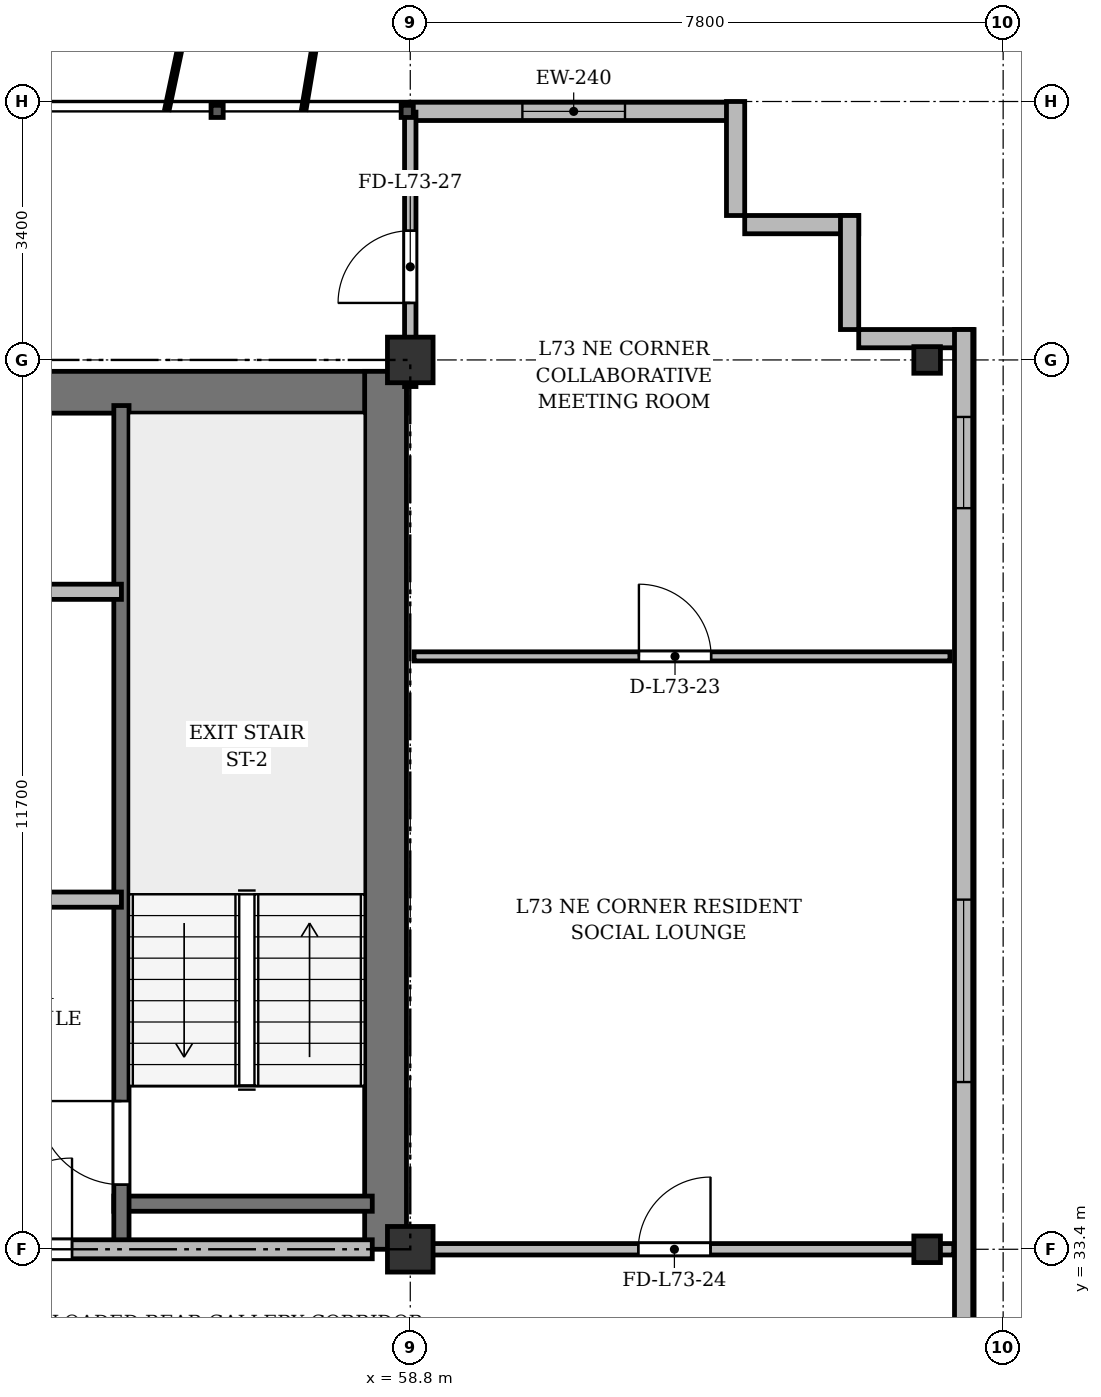
"""IFC4 building model, lengths in metres.
Left out: names, types, materials, properties, quantities, classifications, styles, units other than length and angle.
Written with IfcOpenShell. Run it as: python <this file> out.ifc"""

import sys

from ifc_helpers import new_model, si_unit, direction, frame, frame_2d, origin, origin_2d, place, context, subcontext, project, spatial, rectangle, i_section, extrude, source, transform, mapped, element, fill, save


model = new_model("IFC4")
c1 = context("Model", 3, precision=1e-05, world=origin(), true_north=direction((0.0, 1.0)))
c2 = subcontext(c1, "Body", "Model", "MODEL_VIEW")
j1 = project(units=[si_unit("LENGTHUNIT", "METRE"), si_unit("PLANEANGLEUNIT", "RADIAN")], contexts=[c1])
p1 = place(None, origin())
s1 = spatial("IfcSite", under=j1, at=p1, CompositionType="ELEMENT")
p2 = place(p1, origin())
s2 = spatial("IfcBuilding", under=s1, at=p2, CompositionType="ELEMENT")
p3 = place(p2, frame((0.0, 0.0, 281.1)))
s3 = spatial("IfcBuildingStorey", under=s2, at=p3, CompositionType="ELEMENT", Elevation=281.1)
m1 = source(origin(), c2, "Body", "SweptSolid", [
    extrude(rectangle(XDim=0.6, YDim=0.6, at=origin_2d()), origin(), (0.0, 0.0, 1.0), 3.6),
])
for number, where, z_axis, x_axis in (
    (1, (58.8, 33.4, 0.0), (0.0, 0.0, 1.0), (1.0, 0.0, 0.0)),
    (2, (58.8, 45.1, 0.0), (0.0, 0.0, 1.0), (1.0, 0.0, 0.0)),
):
    element("IfcColumn", number, at=place(p3, frame(where, z_axis=z_axis, x_axis=x_axis)), inside=s3, PredefinedType="COLUMN", context=c2, shape_type="MappedRepresentation", body=[
        mapped(m1, transform((0.0, 0.0, 0.0), x_axis=(1.0, 0.0, 0.0), y_axis=(0.0, 1.0, 0.0), z_axis=(0.0, 0.0, 1.0), scale=1.0)),
    ])
m2 = source(origin(), c2, "Body", "SweptSolid", [
    extrude(i_section(OverallWidth=0.35, OverallDepth=0.35, WebThickness=0.018, FlangeThickness=0.028, at=origin_2d()), origin(), (0.0, 0.0, 1.0), 3.6),
])
for number, where, z_axis, x_axis in (
    (3, (65.6, 33.4, 0.0), (0.0, 0.0, 1.0), (1.0, 0.0, 0.0)),
    (4, (65.6, 45.1, 0.0), (0.0, 0.0, 1.0), (1.0, 0.0, 0.0)),
):
    element("IfcColumn", number, at=place(p3, frame(where, z_axis=z_axis, x_axis=x_axis)), inside=s3, PredefinedType="COLUMN", context=c2, shape_type="MappedRepresentation", body=[
        mapped(m2, transform((0.0, 0.0, 0.0), x_axis=(1.0, 0.0, 0.0), y_axis=(0.0, 1.0, 0.0), z_axis=(0.0, 0.0, 1.0), scale=1.0)),
    ])
p4 = place(p3, frame((58.8, 48.37, 0.0), z_axis=(0.0, 0.0, 1.0), x_axis=(1.0, 0.0, 0.0)))
e5 = element("IfcWall", 5, at=p4, inside=s3, PredefinedType="SOLIDWALL", context=c2, shape_type="SweptSolid", body=[
    extrude(rectangle(XDim=4.3, YDim=0.24, at=frame_2d((2.15, 0.0))), origin(), (0.0, 0.0, 1.0), 3.37),
])
p5 = place(p4, frame((1.475, 0.0, 0.9)))
e6 = element("IfcOpeningElement", 6, at=p5, cuts=e5, PredefinedType="OPENING", context=c2, shape_type="SweptSolid", body=[
    extrude(rectangle(XDim=1.35, YDim=1.5, at=frame_2d((0.675, 0.75))), frame((0.0, 0.13, 0.0), z_axis=(0.0, -1.0, 0.0), x_axis=(1.0, 0.0, 0.0)), (0.0, 0.0, 1.0), 0.26),
])
for number, where, z_axis, x_axis in (
    (7, (63.08, 48.5, 0.0), (0.0, 0.0, 1.0), (0.0, -1.0, 0.0)),
    (8, (63.2, 46.88, 0.0), (0.0, 0.0, 1.0), (1.0, 0.0, 0.0)),
    (9, (64.58, 47.0, 0.0), (0.0, 0.0, 1.0), (0.0, -1.0, 0.0)),
    (10, (64.7, 45.38, 0.0), (0.0, 0.0, 1.0), (1.0, 0.0, 0.0)),
):
    element("IfcWall", number, at=place(p3, frame(where, z_axis=z_axis, x_axis=x_axis)), inside=s3, PredefinedType="SOLIDWALL", context=c2, shape_type="SweptSolid", body=[
        extrude(rectangle(XDim=1.5, YDim=0.24, at=frame_2d((0.75, 0.0))), origin(), (0.0, 0.0, 1.0), 3.37),
    ])
p6 = place(p3, frame((66.08, 45.5, 0.0), z_axis=(0.0, 0.0, 1.0), x_axis=(0.0, -1.0, 0.0)))
e11 = element("IfcWall", 11, at=p6, inside=s3, PredefinedType="SOLIDWALL", context=c2, shape_type="SweptSolid", body=[
    extrude(rectangle(XDim=39.0, YDim=0.24, at=frame_2d((19.5, 0.0))), origin(), (0.0, 0.0, 1.0), 3.37),
])
p7 = place(p6, frame((36.35, 0.0, 0.92)))
e12 = element("IfcOpeningElement", 12, at=p7, cuts=e11, PredefinedType="OPENING", context=c2, shape_type="SweptSolid", body=[
    extrude(rectangle(XDim=1.2, YDim=1.65, at=frame_2d((0.6, 0.825))), frame((0.0, 0.13, 0.0), z_axis=(0.0, -1.0, 0.0), x_axis=(1.0, 0.0, 0.0)), (0.0, 0.0, 1.0), 0.26),
])
p8 = place(p6, frame((32.9, 0.0, 0.92)))
e13 = element("IfcOpeningElement", 13, at=p8, cuts=e11, PredefinedType="OPENING", context=c2, shape_type="SweptSolid", body=[
    extrude(rectangle(XDim=2.4, YDim=2.1, at=frame_2d((1.2, 1.05))), frame((0.0, 0.13, 0.0), z_axis=(0.0, -1.0, 0.0), x_axis=(1.0, 0.0, 0.0)), (0.0, 0.0, 1.0), 0.26),
])
p9 = place(p6, frame((21.5, 0.0, 0.92)))
e14 = element("IfcOpeningElement", 14, at=p9, cuts=e11, PredefinedType="OPENING", context=c2, shape_type="SweptSolid", body=[
    extrude(rectangle(XDim=2.4, YDim=2.1, at=frame_2d((1.2, 1.05))), frame((0.0, 0.13, 0.0), z_axis=(0.0, -1.0, 0.0), x_axis=(1.0, 0.0, 0.0)), (0.0, 0.0, 1.0), 0.26),
])
p10 = place(p6, frame((7.5, 0.0, 0.92)))
e15 = element("IfcOpeningElement", 15, at=p10, cuts=e11, PredefinedType="OPENING", context=c2, shape_type="SweptSolid", body=[
    extrude(rectangle(XDim=2.4, YDim=2.1, at=frame_2d((1.2, 1.05))), frame((0.0, 0.13, 0.0), z_axis=(0.0, -1.0, 0.0), x_axis=(1.0, 0.0, 0.0)), (0.0, 0.0, 1.0), 0.26),
])
p11 = place(p6, frame((1.15, 0.0, 0.92)))
e16 = element("IfcOpeningElement", 16, at=p11, cuts=e11, PredefinedType="OPENING", context=c2, shape_type="SweptSolid", body=[
    extrude(rectangle(XDim=1.2, YDim=1.65, at=frame_2d((0.6, 0.825))), frame((0.0, 0.13, 0.0), z_axis=(0.0, -1.0, 0.0), x_axis=(1.0, 0.0, 0.0)), (0.0, 0.0, 1.0), 0.26),
])
p12 = place(p3, frame((15.65, 44.675, 0.0), z_axis=(0.0, 0.0, 1.0), x_axis=(1.0, 0.0, 0.0)))
e17 = element("IfcWall", 17, at=p12, inside=s3, PredefinedType="SHEAR", context=c2, shape_type="SweptSolid", body=[
    extrude(rectangle(XDim=43.1, YDim=0.55, at=frame_2d((21.55, 0.0))), origin(), (0.0, 0.0, 1.0), 3.37),
])
p13 = place(p3, frame((58.475, 33.4, 0.0), z_axis=(0.0, 0.0, 1.0), x_axis=(0.0, 1.0, 0.0)))
e18 = element("IfcWall", 18, at=p13, inside=s3, PredefinedType="SHEAR", context=c2, shape_type="SweptSolid", body=[
    extrude(rectangle(XDim=11.55, YDim=0.55, at=frame_2d((5.775, 0.0))), origin(), (0.0, 0.0, 1.0), 3.37),
])
p14 = place(p3, frame((54.9, 34.0, 0.0), z_axis=(0.0, 0.0, 1.0), x_axis=(1.0, 0.0, 0.0)))
e19 = element("IfcWall", 19, at=p14, inside=s3, PredefinedType="SHEAR", context=c2, shape_type="SweptSolid", body=[
    extrude(rectangle(XDim=3.4, YDim=0.2, at=frame_2d((1.7, 0.0))), origin(), (0.0, 0.0, 1.0), 3.37),
])
p15 = place(p3, frame((55.0, 33.4, 0.0), z_axis=(0.0, 0.0, 1.0), x_axis=(0.0, 1.0, 0.0)))
e20 = element("IfcWall", 20, at=p15, inside=s3, PredefinedType="SHEAR", context=c2, shape_type="SweptSolid", body=[
    extrude(rectangle(XDim=11.1, YDim=0.2, at=frame_2d((5.55, 0.0))), origin(), (0.0, 0.0, 1.0), 3.37),
])
p16 = place(p15, frame((0.85, 0.0, 0.0)))
e21 = element("IfcOpeningElement", 21, at=p16, cuts=e20, PredefinedType="OPENING", context=c2, shape_type="SweptSolid", body=[
    extrude(rectangle(XDim=1.1, YDim=2.15, at=frame_2d((0.55, 1.075))), frame((0.0, 0.11, 0.0), z_axis=(0.0, -1.0, 0.0), x_axis=(1.0, 0.0, 0.0)), (0.0, 0.0, 1.0), 0.22),
])
p17 = place(p3, frame((47.15, 42.05, 0.0), z_axis=(0.0, 0.0, 1.0), x_axis=(1.0, 0.0, 0.0)))
e22 = element("IfcWall", 22, at=p17, inside=s3, PredefinedType="SOLIDWALL", context=c2, shape_type="SweptSolid", body=[
    extrude(rectangle(XDim=7.85, YDim=0.2, at=frame_2d((3.925, 0.0))), origin(), (0.0, 0.0, 1.0), 2.87),
])
p18 = place(p17, frame((0.75, 0.0, 0.0)))
e23 = element("IfcOpeningElement", 23, at=p18, cuts=e22, PredefinedType="OPENING", context=c2, shape_type="SweptSolid", body=[
    extrude(rectangle(XDim=0.9, YDim=2.1, at=frame_2d((0.45, 1.05))), frame((0.0, 0.11, 0.0), z_axis=(0.0, -1.0, 0.0), x_axis=(1.0, 0.0, 0.0)), (0.0, 0.0, 1.0), 0.22),
])
p19 = place(p17, frame((3.85, 0.0, 0.0)))
e24 = element("IfcOpeningElement", 24, at=p19, cuts=e22, PredefinedType="OPENING", context=c2, shape_type="SweptSolid", body=[
    extrude(rectangle(XDim=0.9, YDim=2.1, at=frame_2d((0.45, 1.05))), frame((0.0, 0.11, 0.0), z_axis=(0.0, -1.0, 0.0), x_axis=(1.0, 0.0, 0.0)), (0.0, 0.0, 1.0), 0.22),
])
p20 = place(p3, frame((52.45, 38.0, 0.0), z_axis=(0.0, 0.0, 1.0), x_axis=(1.0, 0.0, 0.0)))
e25 = element("IfcWall", 25, at=p20, inside=s3, PredefinedType="PARTITIONING", context=c2, shape_type="SweptSolid", body=[
    extrude(rectangle(XDim=2.55, YDim=0.2, at=frame_2d((1.275, 0.0))), origin(), (0.0, 0.0, 1.0), 3.37),
])
p21 = place(p3, frame((47.15, 33.4, 0.0), z_axis=(0.0, 0.0, 1.0), x_axis=(1.0, 0.0, 0.0)))
e26 = element("IfcWall", 26, at=p21, inside=s3, PredefinedType="PARTITIONING", context=c2, shape_type="SweptSolid", body=[
    extrude(rectangle(XDim=11.15, YDim=0.25, at=frame_2d((5.575, 0.0))), origin(), (0.0, 0.0, 1.0), 2.92),
])
p22 = place(p21, frame((0.7, 0.0, 0.0)))
e27 = element("IfcOpeningElement", 27, at=p22, cuts=e26, PredefinedType="OPENING", context=c2, shape_type="SweptSolid", body=[
    extrude(rectangle(XDim=0.95, YDim=2.15, at=frame_2d((0.475, 1.075))), frame((0.0, 0.135, 0.0), z_axis=(0.0, -1.0, 0.0), x_axis=(1.0, 0.0, 0.0)), (0.0, 0.0, 1.0), 0.27),
])
p23 = place(p21, frame((6.0, 0.0, 0.0)))
e28 = element("IfcOpeningElement", 28, at=p23, cuts=e26, PredefinedType="OPENING", context=c2, shape_type="SweptSolid", body=[
    extrude(rectangle(XDim=1.2, YDim=2.15, at=frame_2d((0.6, 1.075))), frame((0.0, 0.135, 0.0), z_axis=(0.0, -1.0, 0.0), x_axis=(1.0, 0.0, 0.0)), (0.0, 0.0, 1.0), 0.27),
])
p24 = place(p3, frame((58.85, 41.2, 0.0), z_axis=(0.0, 0.0, 1.0), x_axis=(1.0, 0.0, 0.0)))
e29 = element("IfcWall", 29, at=p24, inside=s3, PredefinedType="PARTITIONING", context=c2, shape_type="SweptSolid", body=[
    extrude(rectangle(XDim=7.05, YDim=0.12, at=frame_2d((3.525, 0.0))), origin(), (0.0, 0.0, 1.0), 2.87),
])
p25 = place(p24, frame((2.958, 0.0, 0.0)))
e30 = element("IfcOpeningElement", 30, at=p25, cuts=e29, PredefinedType="OPENING", context=c2, shape_type="SweptSolid", body=[
    extrude(rectangle(XDim=0.95, YDim=2.15, at=frame_2d((0.475, 1.075))), frame((0.0, 0.07, 0.0), z_axis=(0.0, -1.0, 0.0), x_axis=(1.0, 0.0, 0.0)), (0.0, 0.0, 1.0), 0.14),
])
p26 = place(p3, frame((58.8, 33.4, 0.0), z_axis=(0.0, 0.0, 1.0), x_axis=(1.0, 0.0, 0.0)))
e31 = element("IfcWall", 31, at=p26, inside=s3, PredefinedType="PARTITIONING", context=c2, shape_type="SweptSolid", body=[
    extrude(rectangle(XDim=7.15, YDim=0.15, at=frame_2d((3.575, 0.0))), origin(), (0.0, 0.0, 1.0), 2.92),
])
p27 = place(p26, frame((3.0, 0.0, 0.0)))
e32 = element("IfcOpeningElement", 32, at=p27, cuts=e31, PredefinedType="OPENING", context=c2, shape_type="SweptSolid", body=[
    extrude(rectangle(XDim=0.95, YDim=2.15, at=frame_2d((0.475, 1.075))), frame((0.0, 0.085, 0.0), z_axis=(0.0, -1.0, 0.0), x_axis=(1.0, 0.0, 0.0)), (0.0, 0.0, 1.0), 0.17),
])
p28 = place(p3, frame((58.8, 44.75, 0.0), z_axis=(0.0, 0.0, 1.0), x_axis=(0.0, 1.0, 0.0)))
e33 = element("IfcWall", 33, at=p28, inside=s3, PredefinedType="PARTITIONING", context=c2, shape_type="SweptSolid", body=[
    extrude(rectangle(XDim=3.61, YDim=0.15, at=frame_2d((1.805, 0.0))), origin(), (0.0, 0.0, 1.0), 2.87),
])
p29 = place(p28, frame((1.1, 0.0, 0.0)))
e34 = element("IfcOpeningElement", 34, at=p29, cuts=e33, PredefinedType="OPENING", context=c2, shape_type="SweptSolid", body=[
    extrude(rectangle(XDim=0.95, YDim=2.15, at=frame_2d((0.475, 1.075))), frame((0.0, 0.085, 0.0), z_axis=(0.0, -1.0, 0.0), x_axis=(1.0, 0.0, 0.0)), (0.0, 0.0, 1.0), 0.17),
])
m3 = source(origin(), c2, "Body", "SweptSolid", [
    extrude(rectangle(XDim=1.35, YDim=1.5, at=frame_2d((0.675, 0.75))), frame((0.0, 0.03, 0.0), z_axis=(0.0, -1.0, 0.0), x_axis=(1.0, 0.0, 0.0)), (0.0, 0.0, 1.0), 0.06),
])
p30 = place(p5, origin())
e35 = element("IfcWindow", 35, at=p30, inside=s3, PartitioningType="SINGLE_PANEL", PredefinedType="WINDOW", context=c2, shape_type="MappedRepresentation", body=[
    mapped(m3, transform((0.0, 0.0, 0.0), x_axis=(1.0, 0.0, 0.0), y_axis=(0.0, 1.0, 0.0), z_axis=(0.0, 0.0, 1.0), scale=1.0)),
])
fill(e6, e35)
m4 = source(origin(), c2, "Body", "SweptSolid", [
    extrude(rectangle(XDim=2.4, YDim=2.1, at=frame_2d((1.2, 1.05))), frame((0.0, 0.03, 0.0), z_axis=(0.0, -1.0, 0.0), x_axis=(1.0, 0.0, 0.0)), (0.0, 0.0, 1.0), 0.06),
])
p31 = place(p10, origin())
e36 = element("IfcWindow", 36, at=p31, inside=s3, PartitioningType="SINGLE_PANEL", PredefinedType="WINDOW", context=c2, shape_type="MappedRepresentation", body=[
    mapped(m4, transform((0.0, 0.0, 0.0), x_axis=(1.0, 0.0, 0.0), y_axis=(0.0, 1.0, 0.0), z_axis=(0.0, 0.0, 1.0), scale=1.0)),
])
fill(e15, e36)
m5 = source(origin(), c2, "Body", "SweptSolid", [
    extrude(rectangle(XDim=1.2, YDim=1.65, at=frame_2d((0.6, 0.825))), frame((0.0, 0.03, 0.0), z_axis=(0.0, -1.0, 0.0), x_axis=(1.0, 0.0, 0.0)), (0.0, 0.0, 1.0), 0.06),
])
p32 = place(p11, origin())
e37 = element("IfcWindow", 37, at=p32, inside=s3, PartitioningType="SINGLE_PANEL", PredefinedType="WINDOW", context=c2, shape_type="MappedRepresentation", body=[
    mapped(m5, transform((0.0, 0.0, 0.0), x_axis=(1.0, 0.0, 0.0), y_axis=(0.0, 1.0, 0.0), z_axis=(0.0, 0.0, 1.0), scale=1.0)),
])
fill(e16, e37)
m6 = source(origin(), c2, "Body", "SweptSolid", [
    extrude(rectangle(XDim=1.1, YDim=2.15, at=frame_2d((0.55, 1.075))), frame((0.0, 0.025, 0.0), z_axis=(0.0, -1.0, 0.0), x_axis=(1.0, 0.0, 0.0)), (0.0, 0.0, 1.0), 0.05),
])
p33 = place(p16, origin())
e38 = element("IfcDoor", 38, at=p33, inside=s3, OperationType="SINGLE_SWING_RIGHT", PredefinedType="DOOR", context=c2, shape_type="MappedRepresentation", body=[
    mapped(m6, transform((0.0, 0.0, 0.0), x_axis=(1.0, 0.0, 0.0), y_axis=(0.0, 1.0, 0.0), z_axis=(0.0, 0.0, 1.0), scale=1.0)),
])
fill(e21, e38)
m7 = source(origin(), c2, "Body", "SweptSolid", [
    extrude(rectangle(XDim=1.2, YDim=2.15, at=frame_2d((0.6, 1.075))), frame((0.0, 0.025, 0.0), z_axis=(0.0, -1.0, 0.0), x_axis=(1.0, 0.0, 0.0)), (0.0, 0.0, 1.0), 0.05),
])
p34 = place(p23, origin())
e39 = element("IfcDoor", 39, at=p34, inside=s3, OperationType="SINGLE_SWING_RIGHT", PredefinedType="DOOR", context=c2, shape_type="MappedRepresentation", body=[
    mapped(m7, transform((0.0, 0.0, 0.0), x_axis=(1.0, 0.0, 0.0), y_axis=(0.0, 1.0, 0.0), z_axis=(0.0, 0.0, 1.0), scale=1.0)),
])
fill(e28, e39)
m8 = source(origin(), c2, "Body", "SweptSolid", [
    extrude(rectangle(XDim=0.95, YDim=2.15, at=frame_2d((0.475, 1.075))), frame((0.0, 0.025, 0.0), z_axis=(0.0, -1.0, 0.0), x_axis=(1.0, 0.0, 0.0)), (0.0, 0.0, 1.0), 0.05),
])
p35 = place(p25, origin())
e40 = element("IfcDoor", 40, at=p35, inside=s3, OperationType="SINGLE_SWING_LEFT", PredefinedType="DOOR", context=c2, shape_type="MappedRepresentation", body=[
    mapped(m8, transform((0.0, 0.0, 0.0), x_axis=(1.0, 0.0, 0.0), y_axis=(0.0, 1.0, 0.0), z_axis=(0.0, 0.0, 1.0), scale=1.0)),
])
fill(e30, e40)
p36 = place(p27, origin())
e41 = element("IfcDoor", 41, at=p36, inside=s3, OperationType="SINGLE_SWING_RIGHT", PredefinedType="DOOR", context=c2, shape_type="MappedRepresentation", body=[
    mapped(m8, transform((0.0, 0.0, 0.0), x_axis=(1.0, 0.0, 0.0), y_axis=(0.0, 1.0, 0.0), z_axis=(0.0, 0.0, 1.0), scale=1.0)),
])
fill(e32, e41)
p37 = place(p29, origin())
e42 = element("IfcDoor", 42, at=p37, inside=s3, OperationType="SINGLE_SWING_LEFT", PredefinedType="DOOR", context=c2, shape_type="MappedRepresentation", body=[
    mapped(m8, transform((0.0, 0.0, 0.0), x_axis=(1.0, 0.0, 0.0), y_axis=(0.0, 1.0, 0.0), z_axis=(0.0, 0.0, 1.0), scale=1.0)),
])
fill(e34, e42)
save(model, sys.argv[1])
